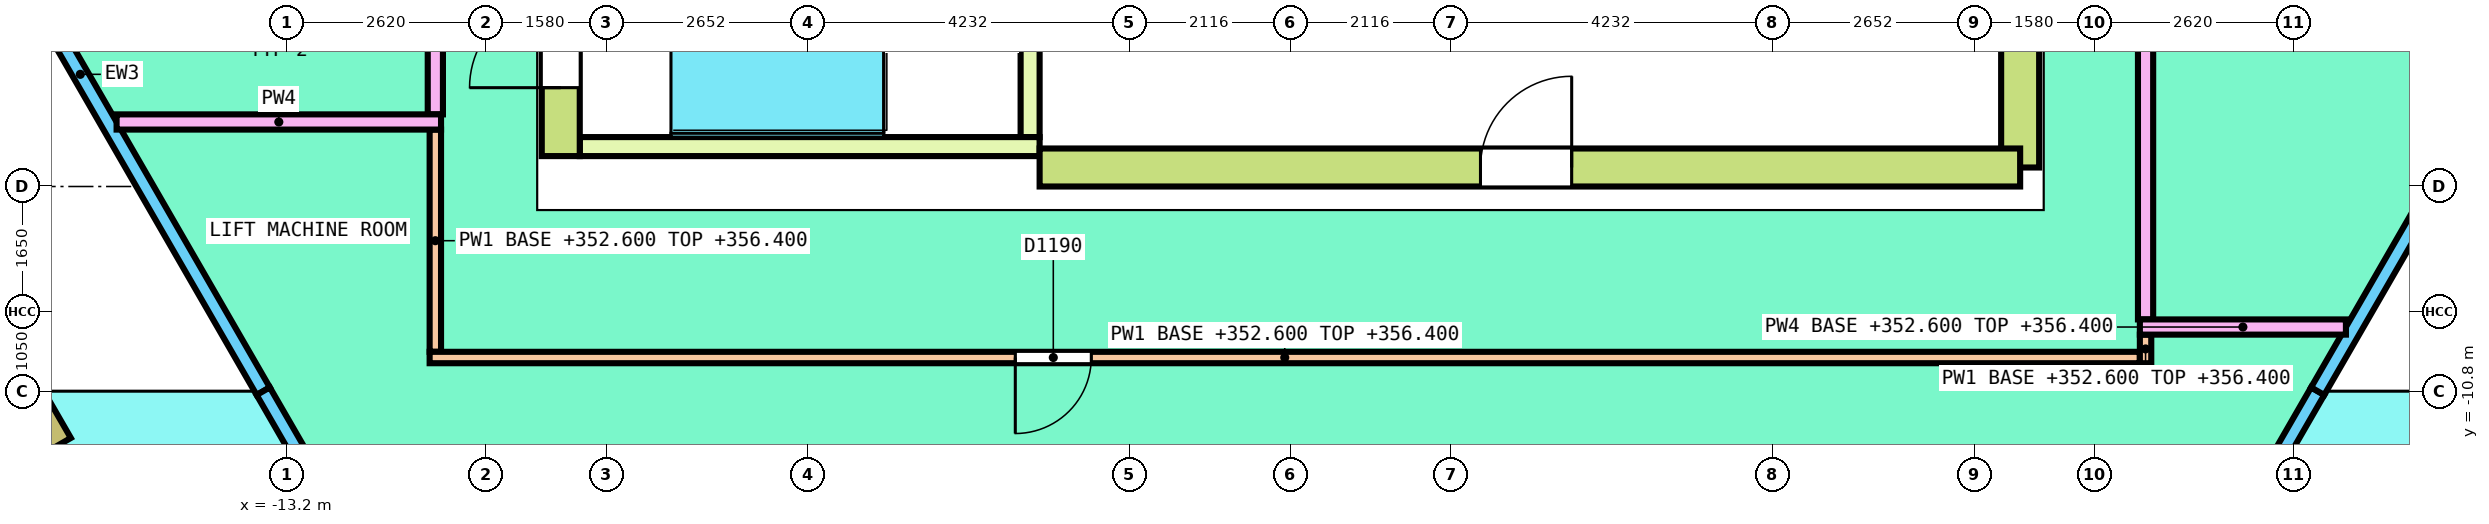
"""IFC4 building model, lengths in metres.
Left out: names, types, materials, properties, quantities, classifications, styles, units other than length and angle.
Written with IfcOpenShell. Run it as: python <this file> out.ifc"""

import sys

from ifc_helpers import new_model, si_unit, direction, frame, frame_2d, origin, origin_2d, place, context, subcontext, project, spatial, polyline, rectangle, hollow_rectangle, outline, extrude, element, fill, save


model = new_model("IFC4")
c1 = context("Model", 3, precision=1e-05, world=origin(), true_north=direction((0.0, 1.0)))
c2 = subcontext(c1, "Body", "Model", "MODEL_VIEW")
j1 = project(units=[si_unit("LENGTHUNIT", "METRE"), si_unit("PLANEANGLEUNIT", "RADIAN")], contexts=[c1])
p1 = place(None, origin())
s1 = spatial("IfcSite", under=j1, at=p1, CompositionType="ELEMENT")
p2 = place(p1, origin())
s2 = spatial("IfcBuilding", under=s1, at=p2, CompositionType="ELEMENT")
p3 = place(p2, frame((0.0, 0.0, 352.6)))
s3 = spatial("IfcBuildingStorey", under=s2, at=p3, CompositionType="ELEMENT", Elevation=352.6)
p4 = place(p3, frame((-16.455, -11.299, 0.0), z_axis=(0.0, 0.0, 1.0), x_axis=(0.5, -0.866025403784, 0.0)))
e1 = element("IfcColumn", 1, at=p4, inside=s3, PredefinedType="COLUMN", context=c2, shape_type="SweptSolid", body=[
    extrude(hollow_rectangle(XDim=0.6, YDim=0.6, WallThickness=0.04, InnerFilletRadius=0.04, OuterFilletRadius=0.08, at=origin_2d()), origin(), (0.0, 0.0, 1.0), 2.71),
])
p5 = place(p3, frame((-18.327, -2.456, 0.0), z_axis=(0.0, 0.0, 1.0), x_axis=(0.499993209709, -0.866029324125, 0.0)))
e2 = element("IfcWall", 2, at=p5, inside=s3, PredefinedType="SOLIDWALL", context=c2, shape_type="SweptSolid", body=[
    extrude(outline(polyline([(-0.027, -0.1), (9.627, -0.1), (9.627, 0.1), (0.027, 0.1), (-0.027, -0.1)])), origin(), (0.0, 0.0, 1.0), 3.8),
])
p6 = place(p3, frame((-13.514, -10.793, 0.0), z_axis=(0.0, 0.0, 1.0), x_axis=(0.500005579313, -0.866022182542, 0.0)))
e3 = element("IfcWall", 3, at=p6, inside=s3, PredefinedType="SOLIDWALL", context=c2, shape_type="SweptSolid", body=[
    extrude(outline(polyline([(0.0, 0.0), (2.886, 0.0), (2.886, 0.03), (0.0, 4.0), (0.0, 0.0)])), frame((0.0, 0.1, 0.0), z_axis=(0.0, -1.0, 0.0), x_axis=(1.0, 0.0, 0.0)), (0.0, 0.0, 1.0), 0.2),
])
p7 = place(p3, frame((12.071, -13.292, 0.0), z_axis=(0.0, 0.0, 1.0), x_axis=(0.500005579313, 0.866022182542, 0.0)))
e4 = element("IfcWall", 4, at=p7, inside=s3, PredefinedType="SOLIDWALL", context=c2, shape_type="SweptSolid", body=[
    extrude(outline(polyline([(0.0, 0.0), (2.886, 0.0), (2.886, 4.0), (0.0, 0.03), (0.0, 0.0)])), frame((0.0, 0.1, 0.0), z_axis=(0.0, -1.0, 0.0), x_axis=(1.0, 0.0, 0.0)), (0.0, 0.0, 1.0), 0.2),
])
p8 = place(p3, frame((13.514, -10.793, 0.0), z_axis=(0.0, 0.0, 1.0), x_axis=(0.499993209709, 0.866029324125, 0.0)))
e5 = element("IfcWall", 5, at=p8, inside=s3, PredefinedType="SOLIDWALL", context=c2, shape_type="SweptSolid", body=[
    extrude(outline(polyline([(0.0, -0.1), (9.654, -0.1), (9.6, 0.1), (0.0, 0.1), (0.0, -0.1)])), origin(), (0.0, 0.0, 1.0), 3.8),
])
p9 = place(p3, frame((9.6, -7.85, 0.0), z_axis=(0.0, 0.0, 1.0), x_axis=(0.0, 1.0, 0.0)))
e6 = element("IfcWall", 6, at=p9, inside=s3, PredefinedType="SHEAR", context=c2, shape_type="SweptSolid", body=[
    extrude(rectangle(XDim=9.35, YDim=0.5, at=frame_2d((4.675, 0.0))), origin(), (0.0, 0.0, 1.0), 3.8),
])
p10 = place(p9, frame((8.15, 0.0, 0.0)))
e7 = element("IfcOpeningElement", 7, at=p10, cuts=e6, PredefinedType="OPENING", context=c2, shape_type="SweptSolid", body=[
    extrude(rectangle(XDim=0.9, YDim=2.1, at=frame_2d((0.45, 1.05))), frame((0.0, 0.26, 0.0), z_axis=(0.0, -1.0, 0.0), x_axis=(1.0, 0.0, 0.0)), (0.0, 0.0, 1.0), 0.52),
])
p11 = place(p3, frame((-3.3, -7.85, 0.0), z_axis=(0.0, 0.0, 1.0), x_axis=(1.0, 0.0, 0.0)))
e8 = element("IfcWall", 8, at=p11, inside=s3, PredefinedType="SHEAR", context=c2, shape_type="SweptSolid", body=[
    extrude(rectangle(XDim=12.9, YDim=0.5, at=frame_2d((6.45, 0.0))), origin(), (0.0, 0.0, 1.0), 3.8),
])
p12 = place(p11, frame((5.8, 0.0, 0.0)))
e9 = element("IfcOpeningElement", 9, at=p12, cuts=e8, PredefinedType="OPENING", context=c2, shape_type="SweptSolid", body=[
    extrude(rectangle(XDim=1.2, YDim=2.1, at=frame_2d((0.6, 1.05))), frame((0.0, 0.26, 0.0), z_axis=(0.0, -1.0, 0.0), x_axis=(1.0, 0.0, 0.0)), (0.0, 0.0, 1.0), 0.52),
])
p13 = place(p3, frame((-9.6, -7.7, 0.0), z_axis=(0.0, 0.0, 1.0), x_axis=(0.0, 1.0, 0.0)))
e10 = element("IfcWall", 10, at=p13, inside=s3, PredefinedType="SHEAR", context=c2, shape_type="SweptSolid", body=[
    extrude(rectangle(XDim=3.05, YDim=0.5, at=frame_2d((1.525, 0.0))), origin(), (0.0, 0.0, 1.0), 3.8),
])
p14 = place(p13, frame((0.9, 0.0, 0.0)))
e11 = element("IfcOpeningElement", 11, at=p14, cuts=e10, PredefinedType="OPENING", context=c2, shape_type="SweptSolid", body=[
    extrude(rectangle(XDim=1.2, YDim=2.1, at=frame_2d((0.6, 1.05))), frame((0.0, 0.26, 0.0), z_axis=(0.0, -1.0, 0.0), x_axis=(1.0, 0.0, 0.0)), (0.0, 0.0, 1.0), 0.52),
])
p15 = place(p3, frame((-3.425, -7.45, 0.0), z_axis=(0.0, 0.0, 1.0), x_axis=(0.0, 1.0, 0.0)))
e12 = element("IfcWall", 12, at=p15, inside=s3, PredefinedType="SOLIDWALL", context=c2, shape_type="SweptSolid", body=[
    extrude(rectangle(XDim=2.55, YDim=0.25, at=frame_2d((1.275, 0.0))), origin(), (0.0, 0.0, 1.0), 3.8),
])
p16 = place(p3, frame((-9.35, -7.575, 0.0), z_axis=(0.0, 0.0, 1.0), x_axis=(1.0, 0.0, 0.0)))
e13 = element("IfcWall", 13, at=p16, inside=s3, PredefinedType="SOLIDWALL", context=c2, shape_type="SweptSolid", body=[
    extrude(rectangle(XDim=6.05, YDim=0.25, at=frame_2d((3.025, 0.0))), origin(), (0.0, 0.0, 1.0), 3.8),
])
p17 = place(p3, frame((-11.25, -10.275, 0.0), z_axis=(0.0, 0.0, 1.0), x_axis=(0.0, 1.0, 0.0)))
e14 = element("IfcWall", 14, at=p17, inside=s3, PredefinedType="PARTITIONING", context=c2, shape_type="SweptSolid", body=[
    extrude(rectangle(XDim=2.924, YDim=0.15, at=frame_2d((1.462, 0.0))), origin(), (0.0, 0.0, 1.0), 3.8),
])
p18 = place(p3, frame((-11.325, -10.35, 0.0), z_axis=(0.0, 0.0, 1.0), x_axis=(1.0, 0.0, 0.0)))
e15 = element("IfcWall", 15, at=p18, inside=s3, PredefinedType="PARTITIONING", context=c2, shape_type="SweptSolid", body=[
    extrude(rectangle(XDim=22.5, YDim=0.15, at=frame_2d((11.25, 0.0))), origin(), (0.0, 0.0, 1.0), 3.8),
])
p19 = place(p18, frame((7.705, 0.0, 0.0)))
e16 = element("IfcOpeningElement", 16, at=p19, cuts=e15, PredefinedType="OPENING", context=c2, shape_type="SweptSolid", body=[
    extrude(rectangle(XDim=1.0, YDim=2.1, at=frame_2d((0.5, 1.05))), frame((0.0, 0.085, 0.0), z_axis=(0.0, -1.0, 0.0), x_axis=(1.0, 0.0, 0.0)), (0.0, 0.0, 1.0), 0.17),
])
p20 = place(p3, frame((11.25, -10.425, 0.0), z_axis=(0.0, 0.0, 1.0), x_axis=(0.0, 1.0, 0.0)))
e17 = element("IfcWall", 17, at=p20, inside=s3, PredefinedType="PARTITIONING", context=c2, shape_type="SweptSolid", body=[
    extrude(rectangle(XDim=0.376, YDim=0.15, at=frame_2d((0.188, 0.0))), origin(), (0.0, 0.0, 1.0), 3.8),
])
p21 = place(p3, frame((11.25, -9.849, 0.0), z_axis=(0.0, 0.0, 1.0), x_axis=(0.0, 1.0, 0.0)))
e18 = element("IfcWall", 18, at=p21, inside=s3, PredefinedType="PARTITIONING", context=c2, shape_type="SweptSolid", body=[
    extrude(rectangle(XDim=20.099, YDim=0.2, at=frame_2d((10.049, 0.0))), origin(), (0.0, 0.0, 1.0), 3.3),
])
p22 = place(p21, frame((15.43, 0.0, 0.0)))
e19 = element("IfcOpeningElement", 19, at=p22, cuts=e18, PredefinedType="OPENING", context=c2, shape_type="SweptSolid", body=[
    extrude(rectangle(XDim=1.2, YDim=2.1, at=frame_2d((0.6, 1.05))), frame((0.0, 0.11, 0.0), z_axis=(0.0, -1.0, 0.0), x_axis=(1.0, 0.0, 0.0)), (0.0, 0.0, 1.0), 0.22),
])
p23 = place(p21, frame((6.287, 0.0, 0.0)))
e20 = element("IfcOpeningElement", 20, at=p23, cuts=e18, PredefinedType="OPENING", context=c2, shape_type="SweptSolid", body=[
    extrude(rectangle(XDim=1.2, YDim=2.1, at=frame_2d((0.6, 1.05))), frame((0.0, 0.11, 0.0), z_axis=(0.0, -1.0, 0.0), x_axis=(1.0, 0.0, 0.0)), (0.0, 0.0, 1.0), 0.22),
])
p24 = place(p3, frame((-11.25, -7.151, 0.0), z_axis=(0.0, 0.0, 1.0), x_axis=(0.0, 1.0, 0.0)))
e21 = element("IfcWall", 21, at=p24, inside=s3, PredefinedType="PARTITIONING", context=c2, shape_type="SweptSolid", body=[
    extrude(rectangle(XDim=9.534, YDim=0.2, at=frame_2d((4.767, 0.0))), origin(), (0.0, 0.0, 1.0), 3.3),
])
p25 = place(p24, frame((2.208, 0.0, 0.0)))
e22 = element("IfcOpeningElement", 22, at=p25, cuts=e21, PredefinedType="OPENING", context=c2, shape_type="SweptSolid", body=[
    extrude(rectangle(XDim=1.2, YDim=2.1, at=frame_2d((0.6, 1.05))), frame((0.0, 0.11, 0.0), z_axis=(0.0, -1.0, 0.0), x_axis=(1.0, 0.0, 0.0)), (0.0, 0.0, 1.0), 0.22),
])
p26 = place(p3, frame((-15.443, -7.251, 0.0), z_axis=(0.0, 0.0, 1.0), x_axis=(1.0, 0.0, 0.0)))
e23 = element("IfcWall", 23, at=p26, inside=s3, PredefinedType="PARTITIONING", context=c2, shape_type="SweptSolid", body=[
    extrude(rectangle(XDim=4.268, YDim=0.2, at=frame_2d((2.134, 0.0))), origin(), (0.0, 0.0, 1.0), 3.3),
])
p27 = place(p3, frame((11.175, -9.949, 0.0), z_axis=(0.0, 0.0, 1.0), x_axis=(1.0, 0.0, 0.0)))
e24 = element("IfcWall", 24, at=p27, inside=s3, PredefinedType="PARTITIONING", context=c2, shape_type="SweptSolid", body=[
    extrude(rectangle(XDim=2.711, YDim=0.2, at=frame_2d((1.355, 0.0))), origin(), (0.0, 0.0, 1.0), 3.8),
])
p28 = place(p14, origin())
e25 = element("IfcDoor", 25, at=p28, inside=s3, OperationType="SINGLE_SWING_RIGHT", PredefinedType="DOOR", context=c2, shape_type="SweptSolid", body=[
    extrude(rectangle(XDim=1.2, YDim=2.1, at=frame_2d((0.6, 1.05))), frame((0.0, 0.2, 0.0), z_axis=(0.0, -1.0, 0.0), x_axis=(1.0, 0.0, 0.0)), (0.0, 0.0, 1.0), 0.4),
])
fill(e11, e25)
p29 = place(p12, origin())
e26 = element("IfcDoor", 26, at=p29, inside=s3, OperationType="SINGLE_SWING_RIGHT", PredefinedType="DOOR", context=c2, shape_type="SweptSolid", body=[
    extrude(rectangle(XDim=1.2, YDim=2.1, at=frame_2d((0.6, 1.05))), frame((0.0, 0.2, 0.0), z_axis=(0.0, -1.0, 0.0), x_axis=(1.0, 0.0, 0.0)), (0.0, 0.0, 1.0), 0.4),
])
fill(e9, e26)
p30 = place(p19, origin())
e27 = element("IfcDoor", 27, at=p30, inside=s3, OperationType="SINGLE_SWING_LEFT", PredefinedType="DOOR", context=c2, shape_type="SweptSolid", body=[
    extrude(rectangle(XDim=1.0, YDim=2.1, at=frame_2d((0.5, 1.05))), frame((0.0, 0.025, 0.0), z_axis=(0.0, -1.0, 0.0), x_axis=(1.0, 0.0, 0.0)), (0.0, 0.0, 1.0), 0.05),
])
fill(e16, e27)
save(model, sys.argv[1])
